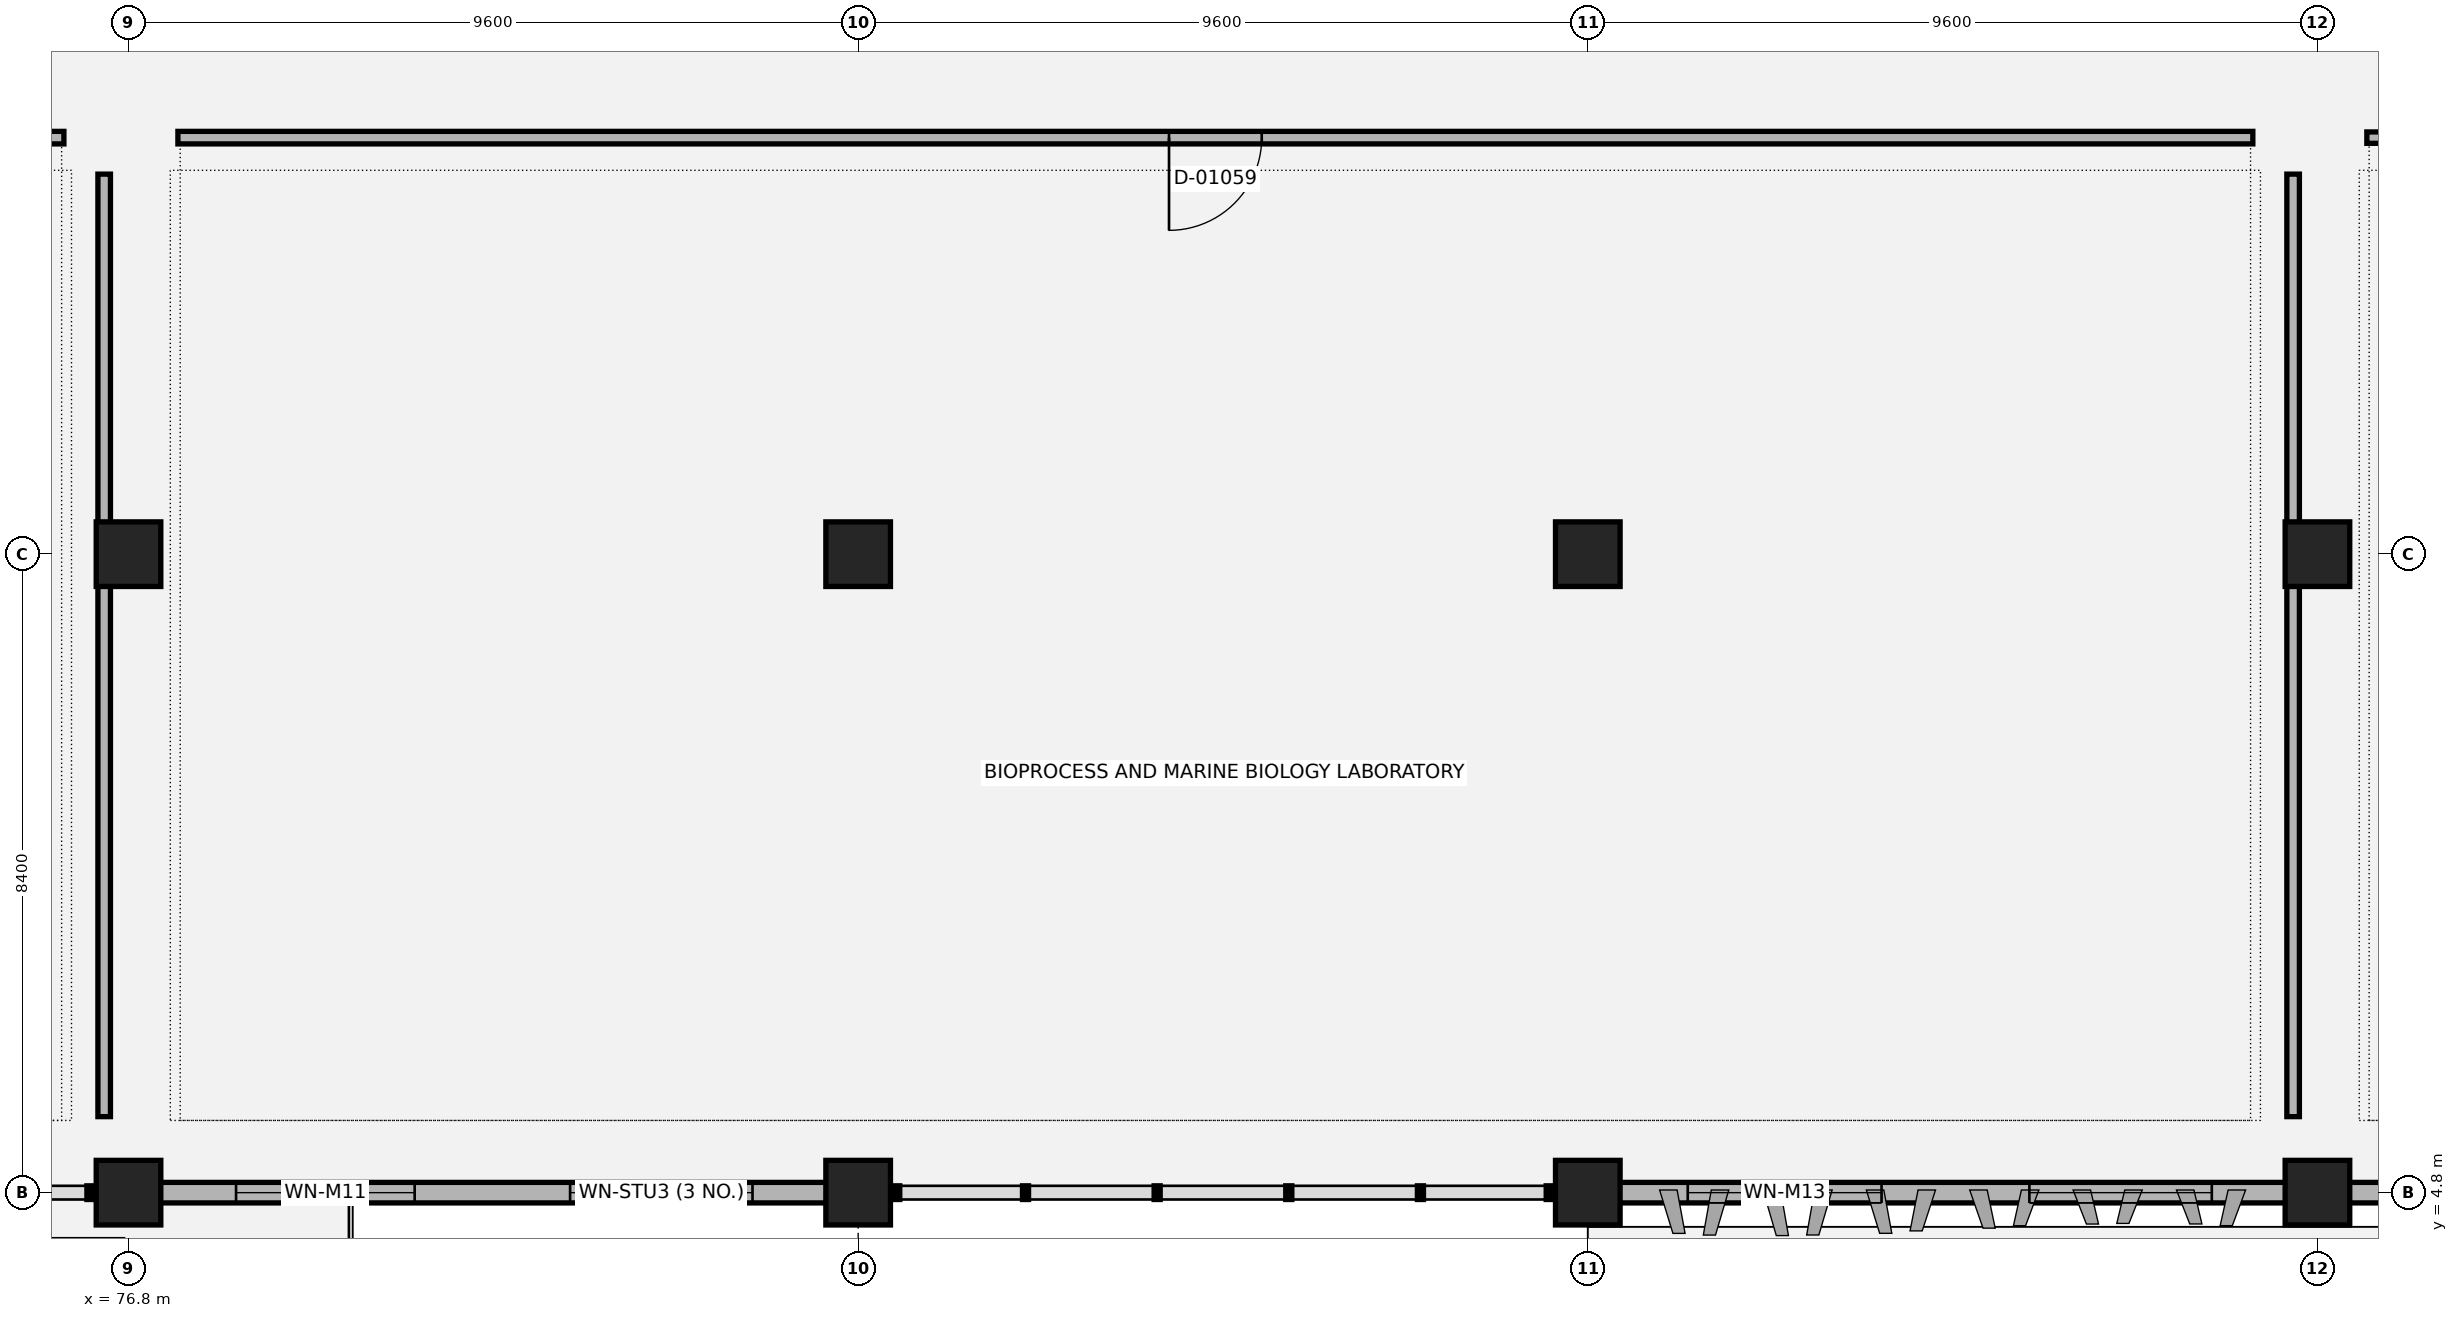
"""IFC4 building model, lengths in metres.
Left out: names, types, materials, properties, quantities, classifications, styles, units other than length and angle.
Written with IfcOpenShell. Run it as: python <this file> out.ifc"""

import sys

from ifc_helpers import new_model, si_unit, direction, frame, frame_2d, origin, origin_2d, place, context, subcontext, project, spatial, rectangle, extrude, element, fill, save


model = new_model("IFC4")
c1 = context("Model", 3, precision=1e-05, world=origin(), true_north=direction((0.0, 1.0)))
c2 = subcontext(c1, "Body", "Model", "MODEL_VIEW")
j1 = project(units=[si_unit("LENGTHUNIT", "METRE"), si_unit("PLANEANGLEUNIT", "RADIAN")], contexts=[c1])
p1 = place(None, origin())
s1 = spatial("IfcSite", under=j1, at=p1, CompositionType="ELEMENT")
p2 = place(p1, origin())
s2 = spatial("IfcBuilding", under=s1, at=p2, CompositionType="ELEMENT")
p3 = place(p2, frame((0.0, 0.0, 5.4)))
s3 = spatial("IfcBuildingStorey", under=s2, at=p3, CompositionType="ELEMENT", Elevation=5.4)
for number, where, z_axis, x_axis in (
    (1, (76.8, 4.8, 0.0), (0.0, 0.0, 1.0), (1.0, 0.0, 0.0)),
    (2, (76.8, 13.2, 0.0), (0.0, 0.0, 1.0), (1.0, 0.0, 0.0)),
    (3, (86.4, 4.8, 0.0), (0.0, 0.0, 1.0), (1.0, 0.0, 0.0)),
    (4, (86.4, 13.2, 0.0), (0.0, 0.0, 1.0), (1.0, 0.0, 0.0)),
    (5, (96.0, 4.8, 0.0), (0.0, 0.0, 1.0), (1.0, 0.0, 0.0)),
    (6, (96.0, 13.2, 0.0), (0.0, 0.0, 1.0), (1.0, 0.0, 0.0)),
    (7, (105.6, 4.8, 0.0), (0.0, 0.0, 1.0), (1.0, 0.0, 0.0)),
    (8, (105.6, 13.2, 0.0), (0.0, 0.0, 1.0), (1.0, 0.0, 0.0)),
):
    element("IfcColumn", number, at=place(p3, frame(where, z_axis=z_axis, x_axis=x_axis)), inside=s3, PredefinedType="COLUMN", context=c2, shape_type="SweptSolid", body=[
        extrude(rectangle(XDim=0.85, YDim=0.85, at=origin_2d()), origin(), (0.0, 0.0, 1.0), 4.8),
    ])
p4 = place(p3, frame((77.18, 4.8, 0.0), z_axis=(0.0, 0.0, 1.0), x_axis=(1.0, 0.0, 0.0)))
e9 = element("IfcWall", 9, at=p4, inside=s3, PredefinedType="SOLIDWALL", context=c2, shape_type="SweptSolid", body=[
    extrude(rectangle(XDim=8.84, YDim=0.27, at=frame_2d((4.42, 0.0))), origin(), (0.0, 0.0, 1.0), 3.28),
])
p5 = place(p4, frame((1.035, 0.0, 0.9)))
e10 = element("IfcOpeningElement", 10, at=p5, cuts=e9, PredefinedType="OPENING", context=c2, shape_type="SweptSolid", body=[
    extrude(rectangle(XDim=2.35, YDim=1.7, at=frame_2d((1.175, 0.85))), frame((0.0, 0.145, 0.0), z_axis=(0.0, -1.0, 0.0), x_axis=(1.0, 0.0, 0.0)), (0.0, 0.0, 1.0), 0.29),
])
p6 = place(p4, frame((5.43, 0.0, 0.9)))
e11 = element("IfcOpeningElement", 11, at=p6, cuts=e9, PredefinedType="OPENING", context=c2, shape_type="SweptSolid", body=[
    extrude(rectangle(XDim=2.4, YDim=1.6, at=frame_2d((1.2, 0.8))), frame((0.0, 0.145, 0.0), z_axis=(0.0, -1.0, 0.0), x_axis=(1.0, 0.0, 0.0)), (0.0, 0.0, 1.0), 0.29),
])
p7 = place(p3, frame((96.38, 4.8, 0.0), z_axis=(0.0, 0.0, 1.0), x_axis=(1.0, 0.0, 0.0)))
e12 = element("IfcWall", 12, at=p7, inside=s3, PredefinedType="SOLIDWALL", context=c2, shape_type="SweptSolid", body=[
    extrude(rectangle(XDim=8.84, YDim=0.27, at=frame_2d((4.42, 0.0))), origin(), (0.0, 0.0, 1.0), 3.28),
])
p8 = place(p7, frame((0.935, 0.0, 0.9)))
e13 = element("IfcOpeningElement", 13, at=p8, cuts=e12, PredefinedType="OPENING", context=c2, shape_type="SweptSolid", body=[
    extrude(rectangle(XDim=2.55, YDim=1.75, at=frame_2d((1.275, 0.875))), frame((0.0, 0.145, 0.0), z_axis=(0.0, -1.0, 0.0), x_axis=(1.0, 0.0, 0.0)), (0.0, 0.0, 1.0), 0.29),
])
p9 = place(p7, frame((5.43, 0.0, 0.9)))
e14 = element("IfcOpeningElement", 14, at=p9, cuts=e12, PredefinedType="OPENING", context=c2, shape_type="SweptSolid", body=[
    extrude(rectangle(XDim=2.4, YDim=1.6, at=frame_2d((1.2, 0.8))), frame((0.0, 0.145, 0.0), z_axis=(0.0, -1.0, 0.0), x_axis=(1.0, 0.0, 0.0)), (0.0, 0.0, 1.0), 0.29),
])
p10 = place(p3, frame((105.98, 4.8, 0.0), z_axis=(0.0, 0.0, 1.0), x_axis=(1.0, 0.0, 0.0)))
e15 = element("IfcWall", 15, at=p10, inside=s3, PredefinedType="SOLIDWALL", context=c2, shape_type="SweptSolid", body=[
    extrude(rectangle(XDim=8.84, YDim=0.27, at=frame_2d((4.42, 0.0))), origin(), (0.0, 0.0, 1.0), 3.28),
])
p11 = place(p10, frame((0.885, 0.0, 0.9)))
e16 = element("IfcOpeningElement", 16, at=p11, cuts=e15, PredefinedType="OPENING", context=c2, shape_type="SweptSolid", body=[
    extrude(rectangle(XDim=2.65, YDim=1.75, at=frame_2d((1.325, 0.875))), frame((0.0, 0.145, 0.0), z_axis=(0.0, -1.0, 0.0), x_axis=(1.0, 0.0, 0.0)), (0.0, 0.0, 1.0), 0.29),
])
p12 = place(p10, frame((5.43, 0.0, 0.9)))
e17 = element("IfcOpeningElement", 17, at=p12, cuts=e15, PredefinedType="OPENING", context=c2, shape_type="SweptSolid", body=[
    extrude(rectangle(XDim=2.4, YDim=1.6, at=frame_2d((1.2, 0.8))), frame((0.0, 0.145, 0.0), z_axis=(0.0, -1.0, 0.0), x_axis=(1.0, 0.0, 0.0)), (0.0, 0.0, 1.0), 0.29),
])
p13 = place(p3, frame((49.05, 18.68, 0.0), z_axis=(0.0, 0.0, 1.0), x_axis=(1.0, 0.0, 0.0)))
e18 = element("IfcWall", 18, at=p13, inside=s3, PredefinedType="PARTITIONING", context=c2, shape_type="SweptSolid", body=[
    extrude(rectangle(XDim=26.9, YDim=0.165, at=frame_2d((13.45, 0.0))), origin(), (0.0, 0.0, 1.0), 3.26),
])
p14 = place(p13, frame((21.48, 0.0, 0.0)))
e19 = element("IfcOpeningElement", 19, at=p14, cuts=e18, PredefinedType="OPENING", context=c2, shape_type="SweptSolid", body=[
    extrude(rectangle(XDim=1.3, YDim=2.15, at=frame_2d((0.65, 1.075))), frame((0.0, 0.093, 0.0), z_axis=(0.0, -1.0, 0.0), x_axis=(1.0, 0.0, 0.0)), (0.0, 0.0, 1.0), 0.185),
])
p15 = place(p3, frame((76.48, 5.8, 0.0), z_axis=(0.0, 0.0, 1.0), x_axis=(0.0, 1.0, 0.0)))
e20 = element("IfcWall", 20, at=p15, inside=s3, PredefinedType="PARTITIONING", context=c2, shape_type="SweptSolid", body=[
    extrude(rectangle(XDim=12.4, YDim=0.165, at=frame_2d((6.2, 0.0))), origin(), (0.0, 0.0, 1.0), 3.26),
])
p16 = place(p3, frame((77.45, 18.68, 0.0), z_axis=(0.0, 0.0, 1.0), x_axis=(1.0, 0.0, 0.0)))
e21 = element("IfcWall", 21, at=p16, inside=s3, PredefinedType="PARTITIONING", context=c2, shape_type="SweptSolid", body=[
    extrude(rectangle(XDim=27.3, YDim=0.165, at=frame_2d((13.65, 0.0))), origin(), (0.0, 0.0, 1.0), 3.26),
])
p17 = place(p16, frame((13.04, 0.0, 0.0)))
e22 = element("IfcOpeningElement", 22, at=p17, cuts=e21, PredefinedType="OPENING", context=c2, shape_type="SweptSolid", body=[
    extrude(rectangle(XDim=1.22, YDim=2.15, at=frame_2d((0.61, 1.075))), frame((0.0, 0.093, 0.0), z_axis=(0.0, -1.0, 0.0), x_axis=(1.0, 0.0, 0.0)), (0.0, 0.0, 1.0), 0.185),
])
p18 = place(p3, frame((105.28, 5.8, 0.0), z_axis=(0.0, 0.0, 1.0), x_axis=(0.0, 1.0, 0.0)))
e23 = element("IfcWall", 23, at=p18, inside=s3, PredefinedType="PARTITIONING", context=c2, shape_type="SweptSolid", body=[
    extrude(rectangle(XDim=12.4, YDim=0.165, at=frame_2d((6.2, 0.0))), origin(), (0.0, 0.0, 1.0), 3.26),
])
p19 = place(p3, frame((106.25, 18.68, 0.0), z_axis=(0.0, 0.0, 1.0), x_axis=(1.0, 0.0, 0.0)))
e24 = element("IfcWall", 24, at=p19, inside=s3, PredefinedType="PARTITIONING", context=c2, shape_type="SweptSolid", body=[
    extrude(rectangle(XDim=17.5, YDim=0.15, at=frame_2d((8.75, 0.0))), origin(), (0.0, 0.0, 1.0), 3.26),
])
p20 = place(p19, frame((3.504, 0.0, 0.0)))
e25 = element("IfcOpeningElement", 25, at=p20, cuts=e24, PredefinedType="OPENING", context=c2, shape_type="SweptSolid", body=[
    extrude(rectangle(XDim=1.18, YDim=2.15, at=frame_2d((0.59, 1.075))), frame((0.0, 0.085, 0.0), z_axis=(0.0, -1.0, 0.0), x_axis=(1.0, 0.0, 0.0)), (0.0, 0.0, 1.0), 0.17),
])
p21 = place(p5, origin())
e26 = element("IfcWindow", 26, at=p21, inside=s3, PartitioningType="SINGLE_PANEL", PredefinedType="WINDOW", context=c2, shape_type="SweptSolid", body=[
    extrude(rectangle(XDim=2.35, YDim=1.7, at=frame_2d((1.175, 0.85))), frame((0.0, 0.03, 0.0), z_axis=(0.0, -1.0, 0.0), x_axis=(1.0, 0.0, 0.0)), (0.0, 0.0, 1.0), 0.06),
])
fill(e10, e26)
p22 = place(p6, origin())
e27 = element("IfcWindow", 27, at=p22, inside=s3, PartitioningType="SINGLE_PANEL", PredefinedType="WINDOW", context=c2, shape_type="SweptSolid", body=[
    extrude(rectangle(XDim=2.4, YDim=1.6, at=frame_2d((1.2, 0.8))), frame((0.0, 0.03, 0.0), z_axis=(0.0, -1.0, 0.0), x_axis=(1.0, 0.0, 0.0)), (0.0, 0.0, 1.0), 0.06),
])
fill(e11, e27)
p23 = place(p8, origin())
e28 = element("IfcWindow", 28, at=p23, inside=s3, PartitioningType="SINGLE_PANEL", PredefinedType="WINDOW", context=c2, shape_type="SweptSolid", body=[
    extrude(rectangle(XDim=2.55, YDim=1.75, at=frame_2d((1.275, 0.875))), frame((0.0, 0.03, 0.0), z_axis=(0.0, -1.0, 0.0), x_axis=(1.0, 0.0, 0.0)), (0.0, 0.0, 1.0), 0.06),
])
fill(e13, e28)
p24 = place(p9, origin())
e29 = element("IfcWindow", 29, at=p24, inside=s3, PartitioningType="SINGLE_PANEL", PredefinedType="WINDOW", context=c2, shape_type="SweptSolid", body=[
    extrude(rectangle(XDim=2.4, YDim=1.6, at=frame_2d((1.2, 0.8))), frame((0.0, 0.03, 0.0), z_axis=(0.0, -1.0, 0.0), x_axis=(1.0, 0.0, 0.0)), (0.0, 0.0, 1.0), 0.06),
])
fill(e14, e29)
p25 = place(p17, origin())
e30 = element("IfcDoor", 30, at=p25, inside=s3, OperationType="SINGLE_SWING_RIGHT", PredefinedType="DOOR", context=c2, shape_type="SweptSolid", body=[
    extrude(rectangle(XDim=1.22, YDim=2.15, at=frame_2d((0.61, 1.075))), frame((0.0, 0.025, 0.0), z_axis=(0.0, -1.0, 0.0), x_axis=(1.0, 0.0, 0.0)), (0.0, 0.0, 1.0), 0.05),
])
fill(e22, e30)
save(model, sys.argv[1])
